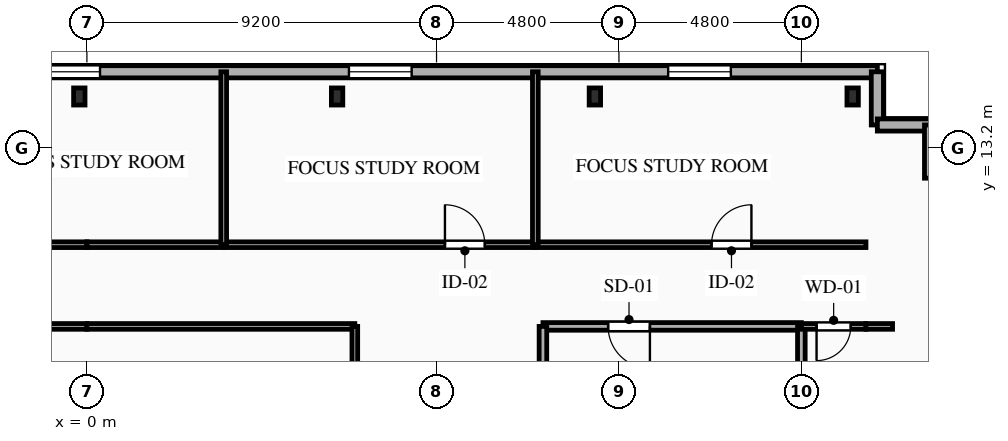
"""IFC4 building model, lengths in metres.
Left out: names, types, materials, properties, quantities, classifications, styles, units other than length and angle.
Written with IfcOpenShell. Run it as: python <this file> out.ifc"""

import sys

from ifc_helpers import new_model, si_unit, direction, frame, frame_2d, origin, origin_2d, place, context, subcontext, project, spatial, rectangle, i_section, extrude, element, fill, save


model = new_model("IFC4")
c1 = context("Model", 3, precision=1e-05, world=origin(), true_north=direction((0.0, 1.0)))
c2 = subcontext(c1, "Body", "Model", "MODEL_VIEW")
j1 = project(units=[si_unit("LENGTHUNIT", "METRE"), si_unit("PLANEANGLEUNIT", "RADIAN")], contexts=[c1])
p1 = place(None, origin())
s1 = spatial("IfcSite", under=j1, at=p1, CompositionType="ELEMENT")
p2 = place(p1, origin())
s2 = spatial("IfcBuilding", under=s1, at=p2, CompositionType="ELEMENT")
p3 = place(p2, frame((0.0, 0.0, 258.45)))
s3 = spatial("IfcBuildingStorey", under=s2, at=p3, CompositionType="ELEMENT", Elevation=258.45)
for number, where, z_axis, x_axis in (
    (1, (20.15, 14.55, 0.0), (0.0, 0.0, 1.0), (1.0, 0.0, 0.0)),
    (2, (13.367, 14.55, 0.0), (0.0, 0.0, 1.0), (1.0, 0.0, 0.0)),
    (3, (6.583, 14.55, 0.0), (0.0, 0.0, 1.0), (1.0, 0.0, 0.0)),
    (4, (-0.2, 14.55, 0.0), (0.0, 0.0, 1.0), (1.0, 0.0, 0.0)),
):
    element("IfcColumn", number, at=place(p3, frame(where, z_axis=z_axis, x_axis=x_axis)), inside=s3, PredefinedType="COLUMN", context=c2, shape_type="SweptSolid", body=[
        extrude(i_section(OverallWidth=0.3, OverallDepth=0.45, WebThickness=0.014, FlangeThickness=0.026, FilletRadius=0.027, at=origin_2d()), origin(), (0.0, 0.0, 1.0), 3.35),
    ])
p4 = place(p3, frame((-21.2, 15.2, 0.0), z_axis=(0.0, 0.0, 1.0), x_axis=(1.0, 0.0, 0.0)))
e5 = element("IfcWall", 5, at=p4, inside=s3, PredefinedType="SOLIDWALL", context=c2, shape_type="SweptSolid", body=[
    extrude(rectangle(XDim=42.0, YDim=0.32, at=frame_2d((21.0, 0.0))), origin(), (0.0, 0.0, 1.0), 3.03),
])
p5 = place(p4, frame((3.735, 0.0, 0.85)))
e6 = element("IfcOpeningElement", 6, at=p5, cuts=e5, PredefinedType="OPENING", context=c2, shape_type="SweptSolid", body=[
    extrude(rectangle(XDim=1.65, YDim=1.85, at=frame_2d((0.825, 0.925))), frame((0.0, 0.17, 0.0), z_axis=(0.0, -1.0, 0.0), x_axis=(1.0, 0.0, 0.0)), (0.0, 0.0, 1.0), 0.34),
])
p6 = place(p4, frame((12.92, 0.0, 0.85)))
e7 = element("IfcOpeningElement", 7, at=p6, cuts=e5, PredefinedType="OPENING", context=c2, shape_type="SweptSolid", body=[
    extrude(rectangle(XDim=1.6, YDim=1.85, at=frame_2d((0.8, 0.925))), frame((0.0, 0.17, 0.0), z_axis=(0.0, -1.0, 0.0), x_axis=(1.0, 0.0, 0.0)), (0.0, 0.0, 1.0), 0.34),
])
p7 = place(p4, frame((19.895, 0.0, 0.85)))
e8 = element("IfcOpeningElement", 8, at=p7, cuts=e5, PredefinedType="OPENING", context=c2, shape_type="SweptSolid", body=[
    extrude(rectangle(XDim=1.65, YDim=1.85, at=frame_2d((0.825, 0.925))), frame((0.0, 0.17, 0.0), z_axis=(0.0, -1.0, 0.0), x_axis=(1.0, 0.0, 0.0)), (0.0, 0.0, 1.0), 0.34),
])
p8 = place(p4, frame((28.095, 0.0, 0.85)))
e9 = element("IfcOpeningElement", 9, at=p8, cuts=e5, PredefinedType="OPENING", context=c2, shape_type="SweptSolid", body=[
    extrude(rectangle(XDim=1.65, YDim=1.85, at=frame_2d((0.825, 0.925))), frame((0.0, 0.17, 0.0), z_axis=(0.0, -1.0, 0.0), x_axis=(1.0, 0.0, 0.0)), (0.0, 0.0, 1.0), 0.34),
])
p9 = place(p4, frame((36.495, 0.0, 0.85)))
e10 = element("IfcOpeningElement", 10, at=p9, cuts=e5, PredefinedType="OPENING", context=c2, shape_type="SweptSolid", body=[
    extrude(rectangle(XDim=1.65, YDim=1.85, at=frame_2d((0.825, 0.925))), frame((0.0, 0.17, 0.0), z_axis=(0.0, -1.0, 0.0), x_axis=(1.0, 0.0, 0.0)), (0.0, 0.0, 1.0), 0.34),
])
for number, where, z_axis, x_axis in (
    (11, (20.8, 15.2, 0.0), (0.0, 0.0, 1.0), (0.0, -1.0, 0.0)),
    (12, (20.8, 13.8, 0.0), (0.0, 0.0, 1.0), (1.0, 0.0, 0.0)),
):
    element("IfcWall", number, at=place(p3, frame(where, z_axis=z_axis, x_axis=x_axis)), inside=s3, PredefinedType="SOLIDWALL", context=c2, shape_type="SweptSolid", body=[
        extrude(rectangle(XDim=1.4, YDim=0.32, at=frame_2d((0.7, 0.0))), origin(), (0.0, 0.0, 1.0), 3.03),
    ])
p10 = place(p3, frame((22.2, 13.8, 0.0), z_axis=(0.0, 0.0, 1.0), x_axis=(0.0, -1.0, 0.0)))
e13 = element("IfcWall", 13, at=p10, inside=s3, PredefinedType="SOLIDWALL", context=c2, shape_type="SweptSolid", body=[
    extrude(rectangle(XDim=1.4, YDim=0.32, at=frame_2d((0.7, 0.0))), origin(), (0.0, 0.0, 1.0), 3.03),
])
p11 = place(p3, frame((18.8, 8.5, 0.0), z_axis=(0.0, 0.0, 1.0), x_axis=(-1.0, 0.0, 0.0)))
e14 = element("IfcWall", 14, at=p11, inside=s3, PredefinedType="PARTITIONING", context=c2, shape_type="SweptSolid", body=[
    extrude(rectangle(XDim=6.8, YDim=0.2, at=frame_2d((3.4, 0.0))), origin(), (0.0, 0.0, 1.0), 3.03),
])
p12 = place(p11, frame((3.985, 0.0, 0.0)))
e15 = element("IfcOpeningElement", 15, at=p12, cuts=e14, PredefinedType="OPENING", context=c2, shape_type="SweptSolid", body=[
    extrude(rectangle(XDim=1.1, YDim=2.15, at=frame_2d((0.55, 1.075))), frame((0.0, 0.11, 0.0), z_axis=(0.0, -1.0, 0.0), x_axis=(1.0, 0.0, 0.0)), (0.0, 0.0, 1.0), 0.22),
])
p13 = place(p3, frame((12.0, 8.5, 0.0), z_axis=(0.0, 0.0, 1.0), x_axis=(0.0, -1.0, 0.0)))
e16 = element("IfcWall", 16, at=p13, inside=s3, PredefinedType="PARTITIONING", context=c2, shape_type="SweptSolid", body=[
    extrude(rectangle(XDim=2.9, YDim=0.2, at=frame_2d((1.45, 0.0))), origin(), (0.0, 0.0, 1.0), 3.03),
])
p14 = place(p3, frame((18.8, 5.6, 0.0), z_axis=(0.0, 0.0, 1.0), x_axis=(0.0, 1.0, 0.0)))
e17 = element("IfcWall", 17, at=p14, inside=s3, PredefinedType="PARTITIONING", context=c2, shape_type="SweptSolid", body=[
    extrude(rectangle(XDim=2.9, YDim=0.2, at=frame_2d((1.45, 0.0))), origin(), (0.0, 0.0, 1.0), 2.655),
])
p15 = place(p3, frame((-4.6, 10.65, 0.0), z_axis=(0.0, 0.0, 1.0), x_axis=(1.0, 0.0, 0.0)))
e18 = element("IfcWall", 18, at=p15, inside=s3, PredefinedType="PARTITIONING", context=c2, shape_type="SweptSolid", body=[
    extrude(rectangle(XDim=4.6, YDim=0.15, at=frame_2d((2.3, 0.0))), origin(), (0.0, 0.0, 1.0), 3.03),
])
p16 = place(p15, frame((0.879, 0.0, 0.0)))
e19 = element("IfcOpeningElement", 19, at=p16, cuts=e18, PredefinedType="OPENING", context=c2, shape_type="SweptSolid", body=[
    extrude(rectangle(XDim=1.05, YDim=2.15, at=frame_2d((0.525, 1.075))), frame((0.0, 0.085, 0.0), z_axis=(0.0, -1.0, 0.0), x_axis=(1.0, 0.0, 0.0)), (0.0, 0.0, 1.0), 0.17),
])
p17 = place(p3, frame((0.0, 8.5, 0.0), z_axis=(0.0, 0.0, 1.0), x_axis=(-1.0, 0.0, 0.0)))
e20 = element("IfcWall", 20, at=p17, inside=s3, PredefinedType="PARTITIONING", context=c2, shape_type="SweptSolid", body=[
    extrude(rectangle(XDim=7.05, YDim=0.15, at=frame_2d((3.525, 0.0))), origin(), (0.0, 0.0, 1.0), 3.03),
])
p18 = place(p17, frame((2.395, 0.0, 0.0)))
e21 = element("IfcOpeningElement", 21, at=p18, cuts=e20, PredefinedType="OPENING", context=c2, shape_type="SweptSolid", body=[
    extrude(rectangle(XDim=1.05, YDim=2.15, at=frame_2d((0.525, 1.075))), frame((0.0, 0.085, 0.0), z_axis=(0.0, -1.0, 0.0), x_axis=(1.0, 0.0, 0.0)), (0.0, 0.0, 1.0), 0.17),
])
p19 = place(p3, frame((20.5, 8.5, 0.0), z_axis=(0.0, 0.0, 1.0), x_axis=(-1.0, 0.0, 0.0)))
e22 = element("IfcWall", 22, at=p19, inside=s3, PredefinedType="PARTITIONING", context=c2, shape_type="SweptSolid", body=[
    extrude(rectangle(XDim=1.7, YDim=0.15, at=frame_2d((0.85, 0.0))), origin(), (0.0, 0.0, 1.0), 3.03),
])
p20 = place(p19, frame((0.4, 0.0, 0.0)))
e23 = element("IfcOpeningElement", 23, at=p20, cuts=e22, PredefinedType="OPENING", context=c2, shape_type="SweptSolid", body=[
    extrude(rectangle(XDim=0.9, YDim=2.1, at=frame_2d((0.45, 1.05))), frame((0.0, 0.085, 0.0), z_axis=(0.0, -1.0, 0.0), x_axis=(1.0, 0.0, 0.0)), (0.0, 0.0, 1.0), 0.17),
])
p21 = place(p3, frame((21.2, 8.5, 0.0), z_axis=(0.0, 0.0, 1.0), x_axis=(-1.0, 0.0, 0.0)))
e24 = element("IfcWall", 24, at=p21, inside=s3, PredefinedType="PARTITIONING", context=c2, shape_type="SweptSolid", body=[
    extrude(rectangle(XDim=0.7, YDim=0.15, at=frame_2d((0.35, 0.0))), origin(), (0.0, 0.0, 1.0), 3.03),
])
p22 = place(p3, frame((0.0, 10.65, 0.0), z_axis=(0.0, 0.0, 1.0), x_axis=(1.0, 0.0, 0.0)))
e25 = element("IfcWall", 25, at=p22, inside=s3, PredefinedType="PARTITIONING", context=c2, shape_type="SweptSolid", body=[
    extrude(rectangle(XDim=3.6, YDim=0.15, at=frame_2d((1.8, 0.0))), origin(), (0.0, 0.0, 1.0), 3.03),
])
p23 = place(p3, frame((3.6, 10.65, 0.0), z_axis=(0.0, 0.0, 1.0), x_axis=(1.0, 0.0, 0.0)))
e26 = element("IfcWall", 26, at=p23, inside=s3, PredefinedType="PARTITIONING", context=c2, shape_type="SweptSolid", body=[
    extrude(rectangle(XDim=8.2, YDim=0.15, at=frame_2d((4.1, 0.0))), origin(), (0.0, 0.0, 1.0), 3.03),
])
p24 = place(p23, frame((5.821, 0.0, 0.0)))
e27 = element("IfcOpeningElement", 27, at=p24, cuts=e26, PredefinedType="OPENING", context=c2, shape_type="SweptSolid", body=[
    extrude(rectangle(XDim=1.05, YDim=2.15, at=frame_2d((0.525, 1.075))), frame((0.0, 0.085, 0.0), z_axis=(0.0, -1.0, 0.0), x_axis=(1.0, 0.0, 0.0)), (0.0, 0.0, 1.0), 0.17),
])
p25 = place(p3, frame((11.8, 10.65, 0.0), z_axis=(0.0, 0.0, 1.0), x_axis=(1.0, 0.0, 0.0)))
e28 = element("IfcWall", 28, at=p25, inside=s3, PredefinedType="PARTITIONING", context=c2, shape_type="SweptSolid", body=[
    extrude(rectangle(XDim=8.7, YDim=0.15, at=frame_2d((4.35, 0.0))), origin(), (0.0, 0.0, 1.0), 3.03),
])
p26 = place(p25, frame((4.636, 0.0, 0.0)))
e29 = element("IfcOpeningElement", 29, at=p26, cuts=e28, PredefinedType="OPENING", context=c2, shape_type="SweptSolid", body=[
    extrude(rectangle(XDim=1.05, YDim=2.15, at=frame_2d((0.525, 1.075))), frame((0.0, 0.085, 0.0), z_axis=(0.0, -1.0, 0.0), x_axis=(1.0, 0.0, 0.0)), (0.0, 0.0, 1.0), 0.17),
])
for number, where, z_axis, x_axis in (
    (30, (7.05, 8.5, 0.0), (0.0, 0.0, 1.0), (-1.0, 0.0, 0.0)),
    (31, (7.05, 1.45, 0.0), (0.0, 0.0, 1.0), (0.0, 1.0, 0.0)),
):
    element("IfcWall", number, at=place(p3, frame(where, z_axis=z_axis, x_axis=x_axis)), inside=s3, PredefinedType="PARTITIONING", context=c2, shape_type="SweptSolid", body=[
        extrude(rectangle(XDim=7.05, YDim=0.15, at=frame_2d((3.525, 0.0))), origin(), (0.0, 0.0, 1.0), 3.03),
    ])
for number, where, z_axis, x_axis in (
    (32, (3.6, 15.2, 0.0), (0.0, 0.0, 1.0), (0.0, -1.0, 0.0)),
    (33, (11.8, 15.2, 0.0), (0.0, 0.0, 1.0), (0.0, -1.0, 0.0)),
):
    element("IfcWall", number, at=place(p3, frame(where, z_axis=z_axis, x_axis=x_axis)), inside=s3, PredefinedType="PARTITIONING", context=c2, shape_type="SweptSolid", body=[
        extrude(rectangle(XDim=4.55, YDim=0.15, at=frame_2d((2.275, 0.0))), origin(), (0.0, 0.0, 1.0), 3.03),
    ])
p27 = place(p7, origin())
e34 = element("IfcWindow", 34, at=p27, inside=s3, PartitioningType="SINGLE_PANEL", PredefinedType="WINDOW", context=c2, shape_type="SweptSolid", body=[
    extrude(rectangle(XDim=1.65, YDim=1.85, at=frame_2d((0.825, 0.925))), frame((0.0, 0.03, 0.0), z_axis=(0.0, -1.0, 0.0), x_axis=(1.0, 0.0, 0.0)), (0.0, 0.0, 1.0), 0.06),
])
fill(e8, e34)
p28 = place(p8, origin())
e35 = element("IfcWindow", 35, at=p28, inside=s3, PartitioningType="SINGLE_PANEL", PredefinedType="WINDOW", context=c2, shape_type="SweptSolid", body=[
    extrude(rectangle(XDim=1.65, YDim=1.85, at=frame_2d((0.825, 0.925))), frame((0.0, 0.03, 0.0), z_axis=(0.0, -1.0, 0.0), x_axis=(1.0, 0.0, 0.0)), (0.0, 0.0, 1.0), 0.06),
])
fill(e9, e35)
p29 = place(p9, origin())
e36 = element("IfcWindow", 36, at=p29, inside=s3, PartitioningType="SINGLE_PANEL", PredefinedType="WINDOW", context=c2, shape_type="SweptSolid", body=[
    extrude(rectangle(XDim=1.65, YDim=1.85, at=frame_2d((0.825, 0.925))), frame((0.0, 0.03, 0.0), z_axis=(0.0, -1.0, 0.0), x_axis=(1.0, 0.0, 0.0)), (0.0, 0.0, 1.0), 0.06),
])
fill(e10, e36)
p30 = place(p12, origin())
e37 = element("IfcDoor", 37, at=p30, inside=s3, OperationType="SINGLE_SWING_LEFT", PredefinedType="DOOR", context=c2, shape_type="SweptSolid", body=[
    extrude(rectangle(XDim=1.1, YDim=2.15, at=frame_2d((0.55, 1.075))), frame((0.0, 0.025, 0.0), z_axis=(0.0, -1.0, 0.0), x_axis=(1.0, 0.0, 0.0)), (0.0, 0.0, 1.0), 0.05),
])
fill(e15, e37)
p31 = place(p20, origin())
e38 = element("IfcDoor", 38, at=p31, inside=s3, OperationType="SINGLE_SWING_RIGHT", PredefinedType="DOOR", context=c2, shape_type="SweptSolid", body=[
    extrude(rectangle(XDim=0.9, YDim=2.1, at=frame_2d((0.45, 1.05))), frame((0.0, 0.025, 0.0), z_axis=(0.0, -1.0, 0.0), x_axis=(1.0, 0.0, 0.0)), (0.0, 0.0, 1.0), 0.05),
])
fill(e23, e38)
p32 = place(p24, origin())
e39 = element("IfcDoor", 39, at=p32, inside=s3, OperationType="SINGLE_SWING_LEFT", PredefinedType="DOOR", context=c2, shape_type="SweptSolid", body=[
    extrude(rectangle(XDim=1.05, YDim=2.15, at=frame_2d((0.525, 1.075))), frame((0.0, 0.025, 0.0), z_axis=(0.0, -1.0, 0.0), x_axis=(1.0, 0.0, 0.0)), (0.0, 0.0, 1.0), 0.05),
])
fill(e27, e39)
p33 = place(p26, origin())
e40 = element("IfcDoor", 40, at=p33, inside=s3, OperationType="SINGLE_SWING_RIGHT", PredefinedType="DOOR", context=c2, shape_type="SweptSolid", body=[
    extrude(rectangle(XDim=1.05, YDim=2.15, at=frame_2d((0.525, 1.075))), frame((0.0, 0.025, 0.0), z_axis=(0.0, -1.0, 0.0), x_axis=(1.0, 0.0, 0.0)), (0.0, 0.0, 1.0), 0.05),
])
fill(e29, e40)
save(model, sys.argv[1])
